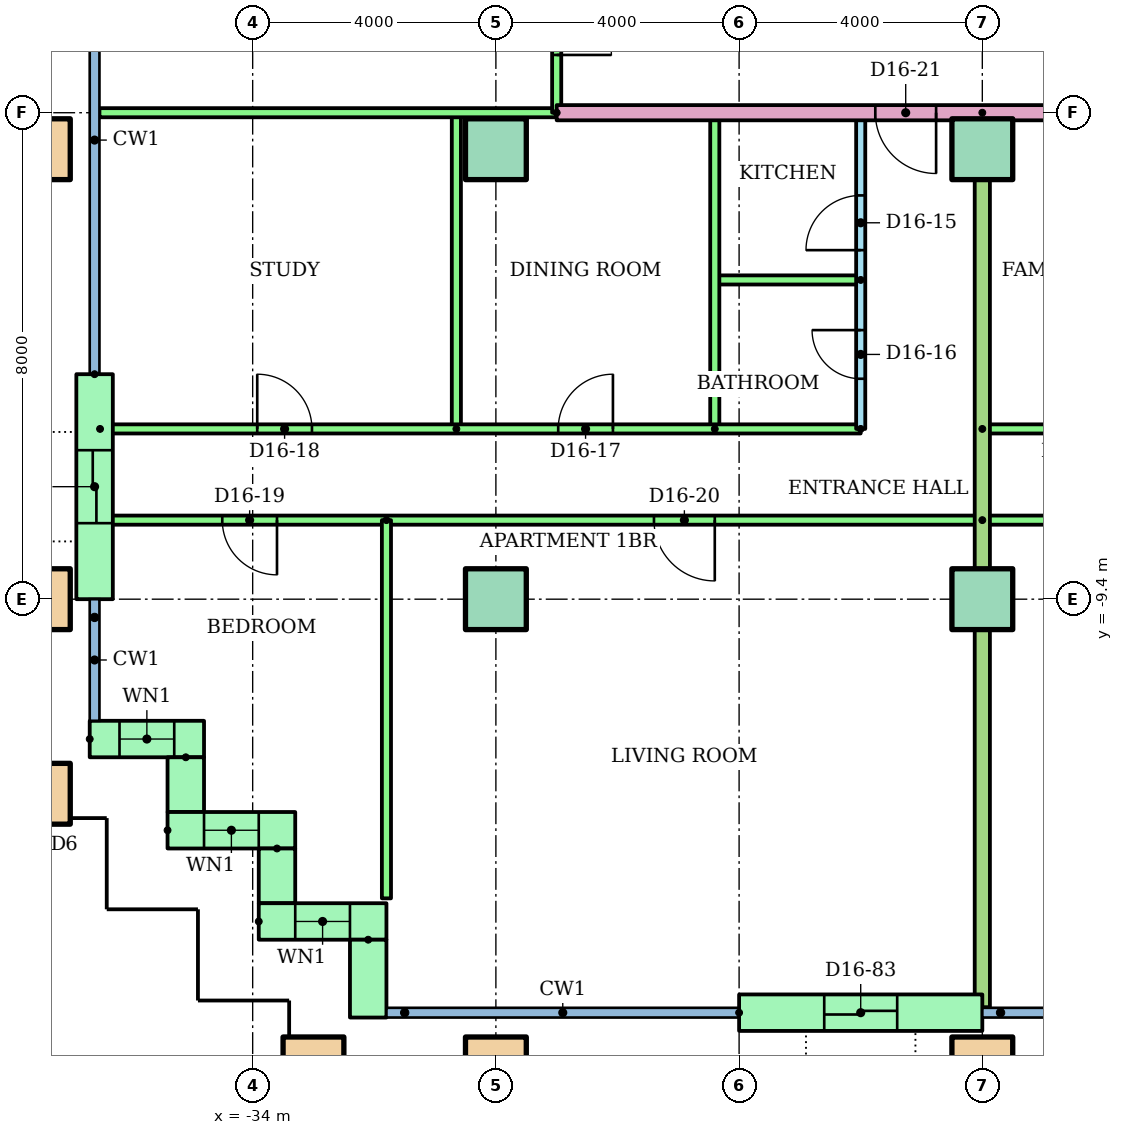
"""IFC4 building model, lengths in metres.
Left out: names, types, materials, properties, quantities, classifications, styles, units other than length and angle.
Written with IfcOpenShell. Run it as: python <this file> out.ifc"""

import sys

from ifc_helpers import new_model, si_unit, direction, frame, frame_2d, origin, origin_2d, place, context, subcontext, project, spatial, rectangle, hollow_rectangle, extrude, element, fill, save


model = new_model("IFC4")
c1 = context("Model", 3, precision=1e-05, world=origin(), true_north=direction((0.0, 1.0)))
c2 = subcontext(c1, "Body", "Model", "MODEL_VIEW")
j1 = project(units=[si_unit("LENGTHUNIT", "METRE"), si_unit("PLANEANGLEUNIT", "RADIAN")], contexts=[c1])
p1 = place(None, origin())
s1 = spatial("IfcSite", under=j1, at=p1, CompositionType="ELEMENT")
p2 = place(p1, origin())
s2 = spatial("IfcBuilding", under=s1, at=p2, CompositionType="ELEMENT")
p3 = place(p2, frame((0.0, 0.0, 60.8)))
s3 = spatial("IfcBuildingStorey", under=s2, at=p3, CompositionType="ELEMENT", Elevation=60.8)
for number, where in (
    (1, (-33.0, -17.1, 0.0)),
    (2, (-30.0, -17.1, 0.0)),
    (3, (-22.0, -17.1, 0.0)),
    (4, (-37.5, -12.6, 0.0)),
    (5, (-37.5, -9.4, 0.0)),
):
    element("IfcColumn", number, at=place(p3, frame(where)), inside=s3, PredefinedType="COLUMN", context=c2, shape_type="SweptSolid", body=[
        extrude(hollow_rectangle(XDim=1.0, YDim=1.0, WallThickness=0.05, at=origin_2d()), origin(), (0.0, 0.0, 1.0), 3.2),
    ])
for number, where in (
    (6, (-30.0, -9.4, 0.0)),
    (7, (-22.0, -9.4, 0.0)),
):
    element("IfcColumn", number, at=place(p3, frame(where)), inside=s3, PredefinedType="COLUMN", context=c2, shape_type="SweptSolid", body=[
        extrude(rectangle(XDim=1.0, YDim=1.0, at=origin_2d()), origin(), (0.0, 0.0, 1.0), 3.2),
    ])
p4 = place(p3, frame((-37.5, -2.0, 0.0)))
e8 = element("IfcColumn", 8, at=p4, inside=s3, PredefinedType="COLUMN", context=c2, shape_type="SweptSolid", body=[
    extrude(hollow_rectangle(XDim=1.0, YDim=1.0, WallThickness=0.05, at=origin_2d()), origin(), (0.0, 0.0, 1.0), 3.2),
])
for number, where in (
    (9, (-30.0, -2.0, 0.0)),
    (10, (-22.0, -2.0, 0.0)),
):
    element("IfcColumn", number, at=place(p3, frame(where)), inside=s3, PredefinedType="COLUMN", context=c2, shape_type="SweptSolid", body=[
        extrude(rectangle(XDim=1.0, YDim=1.0, at=origin_2d()), origin(), (0.0, 0.0, 1.0), 3.2),
    ])
p5 = place(p3, frame((-36.6, -5.7, 0.0), z_axis=(0.0, 0.0, 1.0), x_axis=(0.0, -1.0, 0.0)))
e11 = element("IfcWall", 11, at=p5, inside=s3, PredefinedType="STANDARD", context=c2, shape_type="SweptSolid", body=[
    extrude(rectangle(XDim=3.7, YDim=0.6, at=frame_2d((1.85, 0.0))), origin(), (0.0, 0.0, 1.0), 2.8),
])
p6 = place(p5, frame((1.25, 0.0, 0.0)))
e12 = element("IfcOpeningElement", 12, at=p6, cuts=e11, PredefinedType="OPENING", context=c2, shape_type="SweptSolid", body=[
    extrude(rectangle(XDim=1.2, YDim=2.1, at=frame_2d((0.6, 1.05))), frame((0.0, 0.31, 0.0), z_axis=(0.0, -1.0, 0.0), x_axis=(1.0, 0.0, 0.0)), (0.0, 0.0, 1.0), 0.62),
])
p7 = place(p3, frame((-36.68, -11.7, 0.0)))
e13 = element("IfcWall", 13, at=p7, inside=s3, PredefinedType="STANDARD", context=c2, shape_type="SweptSolid", body=[
    extrude(rectangle(XDim=1.88, YDim=0.6, at=frame_2d((0.94, 0.0))), origin(), (0.0, 0.0, 1.0), 2.8),
])
p8 = place(p7, frame((0.49, 0.0, 0.9)))
e14 = element("IfcOpeningElement", 14, at=p8, cuts=e13, PredefinedType="OPENING", context=c2, shape_type="SweptSolid", body=[
    extrude(rectangle(XDim=0.9, YDim=1.5, at=frame_2d((0.45, 0.75))), frame((0.0, 0.31, 0.0), z_axis=(0.0, -1.0, 0.0), x_axis=(1.0, 0.0, 0.0)), (0.0, 0.0, 1.0), 0.62),
])
p9 = place(p3, frame((-35.1, -12.0, 0.0), z_axis=(0.0, 0.0, 1.0), x_axis=(0.0, -1.0, 0.0)))
e15 = element("IfcWall", 15, at=p9, inside=s3, PredefinedType="STANDARD", context=c2, shape_type="SweptSolid", body=[
    extrude(rectangle(XDim=0.9, YDim=0.6, at=frame_2d((0.45, 0.0))), origin(), (0.0, 0.0, 1.0), 2.8),
])
p10 = place(p3, frame((-35.4, -13.2, 0.0)))
e16 = element("IfcWall", 16, at=p10, inside=s3, PredefinedType="STANDARD", context=c2, shape_type="SweptSolid", body=[
    extrude(rectangle(XDim=2.1, YDim=0.6, at=frame_2d((1.05, 0.0))), origin(), (0.0, 0.0, 1.0), 2.8),
])
p11 = place(p10, frame((0.6, 0.0, 0.9)))
e17 = element("IfcOpeningElement", 17, at=p11, cuts=e16, PredefinedType="OPENING", context=c2, shape_type="SweptSolid", body=[
    extrude(rectangle(XDim=0.9, YDim=1.5, at=frame_2d((0.45, 0.75))), frame((0.0, 0.31, 0.0), z_axis=(0.0, -1.0, 0.0), x_axis=(1.0, 0.0, 0.0)), (0.0, 0.0, 1.0), 0.62),
])
p12 = place(p3, frame((-33.6, -13.5, 0.0), z_axis=(0.0, 0.0, 1.0), x_axis=(0.0, -1.0, 0.0)))
e18 = element("IfcWall", 18, at=p12, inside=s3, PredefinedType="STANDARD", context=c2, shape_type="SweptSolid", body=[
    extrude(rectangle(XDim=0.9, YDim=0.6, at=frame_2d((0.45, 0.0))), origin(), (0.0, 0.0, 1.0), 2.8),
])
p13 = place(p3, frame((-33.9, -14.7, 0.0)))
e19 = element("IfcWall", 19, at=p13, inside=s3, PredefinedType="STANDARD", context=c2, shape_type="SweptSolid", body=[
    extrude(rectangle(XDim=2.1, YDim=0.6, at=frame_2d((1.05, 0.0))), origin(), (0.0, 0.0, 1.0), 2.8),
])
p14 = place(p13, frame((0.6, 0.0, 0.9)))
e20 = element("IfcOpeningElement", 20, at=p14, cuts=e19, PredefinedType="OPENING", context=c2, shape_type="SweptSolid", body=[
    extrude(rectangle(XDim=0.9, YDim=1.5, at=frame_2d((0.45, 0.75))), frame((0.0, 0.31, 0.0), z_axis=(0.0, -1.0, 0.0), x_axis=(1.0, 0.0, 0.0)), (0.0, 0.0, 1.0), 0.62),
])
p15 = place(p3, frame((-32.1, -15.0, 0.0), z_axis=(0.0, 0.0, 1.0), x_axis=(0.0, -1.0, 0.0)))
e21 = element("IfcWall", 21, at=p15, inside=s3, PredefinedType="STANDARD", context=c2, shape_type="SweptSolid", body=[
    extrude(rectangle(XDim=1.28, YDim=0.6, at=frame_2d((0.64, 0.0))), origin(), (0.0, 0.0, 1.0), 2.8),
])
p16 = place(p3, frame((-26.0, -16.2, 0.0)))
e22 = element("IfcWall", 22, at=p16, inside=s3, PredefinedType="STANDARD", context=c2, shape_type="SweptSolid", body=[
    extrude(rectangle(XDim=4.0, YDim=0.6, at=frame_2d((2.0, 0.0))), origin(), (0.0, 0.0, 1.0), 2.8),
])
p17 = place(p16, frame((1.4, 0.0, 0.0)))
e23 = element("IfcOpeningElement", 23, at=p17, cuts=e22, PredefinedType="OPENING", context=c2, shape_type="SweptSolid", body=[
    extrude(rectangle(XDim=1.2, YDim=2.1, at=frame_2d((0.6, 1.05))), frame((0.0, 0.31, 0.0), z_axis=(0.0, -1.0, 0.0), x_axis=(1.0, 0.0, 0.0)), (0.0, 0.0, 1.0), 0.62),
])
p18 = place(p3, frame((-24.0, -6.6, 0.0), z_axis=(0.0, 0.0, 1.0), x_axis=(0.0, 1.0, 0.0)))
e24 = element("IfcWall", 24, at=p18, inside=s3, PredefinedType="PARTITIONING", context=c2, shape_type="SweptSolid", body=[
    extrude(rectangle(XDim=5.2, YDim=0.15, at=frame_2d((2.6, 0.0))), origin(), (0.0, 0.0, 1.0), 2.4),
])
p19 = place(p18, frame((2.94, 0.0, 0.0)))
e25 = element("IfcOpeningElement", 25, at=p19, cuts=e24, PredefinedType="OPENING", context=c2, shape_type="SweptSolid", body=[
    extrude(rectangle(XDim=0.9, YDim=2.1, at=frame_2d((0.45, 1.05))), frame((0.0, 0.085, 0.0), z_axis=(0.0, -1.0, 0.0), x_axis=(1.0, 0.0, 0.0)), (0.0, 0.0, 1.0), 0.17),
])
p20 = place(p18, frame((0.825, 0.0, 0.0)))
e26 = element("IfcOpeningElement", 26, at=p20, cuts=e24, PredefinedType="OPENING", context=c2, shape_type="SweptSolid", body=[
    extrude(rectangle(XDim=0.8, YDim=2.1, at=frame_2d((0.4, 1.05))), frame((0.0, 0.085, 0.0), z_axis=(0.0, -1.0, 0.0), x_axis=(1.0, 0.0, 0.0)), (0.0, 0.0, 1.0), 0.17),
])
p21 = place(p3, frame((-24.0, -4.15, 0.0), z_axis=(0.0, 0.0, 1.0), x_axis=(-1.0, 0.0, 0.0)))
e27 = element("IfcWall", 27, at=p21, inside=s3, PredefinedType="PARTITIONING", context=c2, shape_type="SweptSolid", body=[
    extrude(rectangle(XDim=2.4, YDim=0.15, at=frame_2d((1.2, 0.0))), origin(), (0.0, 0.0, 1.0), 2.4),
])
for number, where, z_axis, x_axis in (
    (28, (-26.4, -6.6, 0.0), (0.0, 0.0, 1.0), (0.0, 1.0, 0.0)),
    (29, (-30.65, -6.6, 0.0), (0.0, 0.0, 1.0), (0.0, 1.0, 0.0)),
):
    element("IfcWall", number, at=place(p3, frame(where, z_axis=z_axis, x_axis=x_axis)), inside=s3, PredefinedType="PARTITIONING", context=c2, shape_type="SweptSolid", body=[
        extrude(rectangle(XDim=5.2, YDim=0.15, at=frame_2d((2.6, 0.0))), origin(), (0.0, 0.0, 1.0), 2.4),
    ])
p22 = place(p3, frame((-36.51, -6.6, 0.0)))
e30 = element("IfcWall", 30, at=p22, inside=s3, PredefinedType="PARTITIONING", context=c2, shape_type="SweptSolid", body=[
    extrude(rectangle(XDim=12.51, YDim=0.15, at=frame_2d((6.255, 0.0))), origin(), (0.0, 0.0, 1.0), 2.4),
])
p23 = place(p22, frame((7.535, 0.0, 0.0)))
e31 = element("IfcOpeningElement", 31, at=p23, cuts=e30, PredefinedType="OPENING", context=c2, shape_type="SweptSolid", body=[
    extrude(rectangle(XDim=0.9, YDim=2.1, at=frame_2d((0.45, 1.05))), frame((0.0, 0.085, 0.0), z_axis=(0.0, -1.0, 0.0), x_axis=(1.0, 0.0, 0.0)), (0.0, 0.0, 1.0), 0.17),
])
p24 = place(p22, frame((2.585, 0.0, 0.0)))
e32 = element("IfcOpeningElement", 32, at=p24, cuts=e30, PredefinedType="OPENING", context=c2, shape_type="SweptSolid", body=[
    extrude(rectangle(XDim=0.9, YDim=2.1, at=frame_2d((0.45, 1.05))), frame((0.0, 0.085, 0.0), z_axis=(0.0, -1.0, 0.0), x_axis=(1.0, 0.0, 0.0)), (0.0, 0.0, 1.0), 0.17),
])
p25 = place(p3, frame((-22.0, -8.1, 0.0), z_axis=(0.0, 0.0, 1.0), x_axis=(-1.0, 0.0, 0.0)))
e33 = element("IfcWall", 33, at=p25, inside=s3, PredefinedType="PARTITIONING", context=c2, shape_type="SweptSolid", body=[
    extrude(rectangle(XDim=14.51, YDim=0.15, at=frame_2d((7.255, 0.0))), origin(), (0.0, 0.0, 1.0), 2.4),
])
p26 = place(p25, frame((11.6, 0.0, 0.0)))
e34 = element("IfcOpeningElement", 34, at=p26, cuts=e33, PredefinedType="OPENING", context=c2, shape_type="SweptSolid", body=[
    extrude(rectangle(XDim=0.9, YDim=2.1, at=frame_2d((0.45, 1.05))), frame((0.0, 0.085, 0.0), z_axis=(0.0, -1.0, 0.0), x_axis=(1.0, 0.0, 0.0)), (0.0, 0.0, 1.0), 0.17),
])
p27 = place(p25, frame((4.4, 0.0, 0.0)))
e35 = element("IfcOpeningElement", 35, at=p27, cuts=e33, PredefinedType="OPENING", context=c2, shape_type="SweptSolid", body=[
    extrude(rectangle(XDim=1.0, YDim=2.1, at=frame_2d((0.5, 1.05))), frame((0.0, 0.085, 0.0), z_axis=(0.0, -1.0, 0.0), x_axis=(1.0, 0.0, 0.0)), (0.0, 0.0, 1.0), 0.17),
])
p28 = place(p3, frame((-31.8, -8.1, 0.0), z_axis=(0.0, 0.0, 1.0), x_axis=(0.0, -1.0, 0.0)))
e36 = element("IfcWall", 36, at=p28, inside=s3, PredefinedType="PARTITIONING", context=c2, shape_type="SweptSolid", body=[
    extrude(rectangle(XDim=6.22, YDim=0.15, at=frame_2d((3.11, 0.0))), origin(), (0.0, 0.0, 1.0), 2.4),
])
p29 = place(p3, frame((-22.0, -6.6, 0.0)))
e37 = element("IfcWall", 37, at=p29, inside=s3, PredefinedType="PARTITIONING", context=c2, shape_type="SweptSolid", body=[
    extrude(rectangle(XDim=14.0, YDim=0.15, at=frame_2d((7.0, 0.0))), origin(), (0.0, 0.0, 1.0), 2.4),
])
p30 = place(p29, frame((8.775, 0.0, 0.0)))
e38 = element("IfcOpeningElement", 38, at=p30, cuts=e37, PredefinedType="OPENING", context=c2, shape_type="SweptSolid", body=[
    extrude(rectangle(XDim=0.9, YDim=2.1, at=frame_2d((0.45, 1.05))), frame((0.0, 0.085, 0.0), z_axis=(0.0, -1.0, 0.0), x_axis=(1.0, 0.0, 0.0)), (0.0, 0.0, 1.0), 0.17),
])
p31 = place(p29, frame((4.525, 0.0, 0.0)))
e39 = element("IfcOpeningElement", 39, at=p31, cuts=e37, PredefinedType="OPENING", context=c2, shape_type="SweptSolid", body=[
    extrude(rectangle(XDim=0.9, YDim=2.1, at=frame_2d((0.45, 1.05))), frame((0.0, 0.085, 0.0), z_axis=(0.0, -1.0, 0.0), x_axis=(1.0, 0.0, 0.0)), (0.0, 0.0, 1.0), 0.17),
])
p32 = place(p29, frame((1.1, 0.0, 0.0)))
e40 = element("IfcOpeningElement", 40, at=p32, cuts=e37, PredefinedType="OPENING", context=c2, shape_type="SweptSolid", body=[
    extrude(rectangle(XDim=0.9, YDim=2.1, at=frame_2d((0.45, 1.05))), frame((0.0, 0.085, 0.0), z_axis=(0.0, -1.0, 0.0), x_axis=(1.0, 0.0, 0.0)), (0.0, 0.0, 1.0), 0.17),
])
p33 = place(p3, frame((-6.0, -8.1, 0.0), z_axis=(0.0, 0.0, 1.0), x_axis=(-1.0, 0.0, 0.0)))
e41 = element("IfcWall", 41, at=p33, inside=s3, PredefinedType="PARTITIONING", context=c2, shape_type="SweptSolid", body=[
    extrude(rectangle(XDim=16.0, YDim=0.15, at=frame_2d((8.0, 0.0))), origin(), (0.0, 0.0, 1.0), 2.4),
])
p34 = place(p33, frame((13.55, 0.0, 0.0)))
e42 = element("IfcOpeningElement", 42, at=p34, cuts=e41, PredefinedType="OPENING", context=c2, shape_type="SweptSolid", body=[
    extrude(rectangle(XDim=0.9, YDim=2.1, at=frame_2d((0.45, 1.05))), frame((0.0, 0.085, 0.0), z_axis=(0.0, -1.0, 0.0), x_axis=(1.0, 0.0, 0.0)), (0.0, 0.0, 1.0), 0.17),
])
p35 = place(p33, frame((9.5, 0.0, 0.0)))
e43 = element("IfcOpeningElement", 43, at=p35, cuts=e41, PredefinedType="OPENING", context=c2, shape_type="SweptSolid", body=[
    extrude(rectangle(XDim=1.0, YDim=2.1, at=frame_2d((0.5, 1.05))), frame((0.0, 0.085, 0.0), z_axis=(0.0, -1.0, 0.0), x_axis=(1.0, 0.0, 0.0)), (0.0, 0.0, 1.0), 0.17),
])
p36 = place(p33, frame((5.55, 0.0, 0.0)))
e44 = element("IfcOpeningElement", 44, at=p36, cuts=e41, PredefinedType="OPENING", context=c2, shape_type="SweptSolid", body=[
    extrude(rectangle(XDim=0.9, YDim=2.1, at=frame_2d((0.45, 1.05))), frame((0.0, 0.085, 0.0), z_axis=(0.0, -1.0, 0.0), x_axis=(1.0, 0.0, 0.0)), (0.0, 0.0, 1.0), 0.17),
])
p37 = place(p33, frame((1.55, 0.0, 0.0)))
e45 = element("IfcOpeningElement", 45, at=p37, cuts=e41, PredefinedType="OPENING", context=c2, shape_type="SweptSolid", body=[
    extrude(rectangle(XDim=0.9, YDim=2.1, at=frame_2d((0.45, 1.05))), frame((0.0, 0.085, 0.0), z_axis=(0.0, -1.0, 0.0), x_axis=(1.0, 0.0, 0.0)), (0.0, 0.0, 1.0), 0.17),
])
p38 = place(p3, frame((-22.0, -1.4, 0.0), z_axis=(0.0, 0.0, 1.0), x_axis=(0.0, -1.0, 0.0)))
e46 = element("IfcWall", 46, at=p38, inside=s3, PredefinedType="PARTITIONING", context=c2, shape_type="SweptSolid", body=[
    extrude(rectangle(XDim=14.71, YDim=0.25, at=frame_2d((7.355, 0.0))), origin(), (0.0, 0.0, 1.0), 2.4),
])
p39 = place(p3, frame((-14.0, -1.4, 0.0), z_axis=(0.0, 0.0, 1.0), x_axis=(-1.0, 0.0, 0.0)))
e47 = element("IfcWall", 47, at=p39, inside=s3, PredefinedType="PARTITIONING", context=c2, shape_type="SweptSolid", body=[
    extrude(rectangle(XDim=15.0, YDim=0.25, at=frame_2d((7.5, 0.0))), origin(), (0.0, 0.0, 1.0), 2.4),
])
p40 = place(p39, frame((8.76, 0.0, 0.0)))
e48 = element("IfcOpeningElement", 48, at=p40, cuts=e47, PredefinedType="OPENING", context=c2, shape_type="SweptSolid", body=[
    extrude(rectangle(XDim=1.0, YDim=2.1, at=frame_2d((0.5, 1.05))), frame((0.0, 0.135, 0.0), z_axis=(0.0, -1.0, 0.0), x_axis=(1.0, 0.0, 0.0)), (0.0, 0.0, 1.0), 0.27),
])
p41 = place(p3, frame((-29.0, -1.4, 0.0), z_axis=(0.0, 0.0, 1.0), x_axis=(-1.0, 0.0, 0.0)))
e49 = element("IfcWall", 49, at=p41, inside=s3, PredefinedType="PARTITIONING", context=c2, shape_type="SweptSolid", body=[
    extrude(rectangle(XDim=7.52, YDim=0.15, at=frame_2d((3.76, 0.0))), origin(), (0.0, 0.0, 1.0), 2.4),
])
p42 = place(p3, frame((-29.0, 1.4, 0.0), z_axis=(0.0, 0.0, 1.0), x_axis=(0.0, -1.0, 0.0)))
e50 = element("IfcWall", 50, at=p42, inside=s3, PredefinedType="PARTITIONING", context=c2, shape_type="SweptSolid", body=[
    extrude(rectangle(XDim=2.8, YDim=0.15, at=frame_2d((1.4, 0.0))), origin(), (0.0, 0.0, 1.0), 2.4),
])
p43 = place(p42, frame((0.95, 0.0, 0.0)))
e51 = element("IfcOpeningElement", 51, at=p43, cuts=e50, PredefinedType="OPENING", context=c2, shape_type="SweptSolid", body=[
    extrude(rectangle(XDim=0.9, YDim=2.1, at=frame_2d((0.45, 1.05))), frame((0.0, 0.085, 0.0), z_axis=(0.0, -1.0, 0.0), x_axis=(1.0, 0.0, 0.0)), (0.0, 0.0, 1.0), 0.17),
])
p44 = place(p8, origin())
e52 = element("IfcWindow", 52, at=p44, inside=s3, PartitioningType="SINGLE_PANEL", PredefinedType="WINDOW", context=c2, shape_type="SweptSolid", body=[
    extrude(rectangle(XDim=0.9, YDim=1.5, at=frame_2d((0.45, 0.75))), frame((0.0, 0.03, 0.0), z_axis=(0.0, -1.0, 0.0), x_axis=(1.0, 0.0, 0.0)), (0.0, 0.0, 1.0), 0.06),
])
fill(e14, e52)
p45 = place(p11, origin())
e53 = element("IfcWindow", 53, at=p45, inside=s3, PartitioningType="SINGLE_PANEL", PredefinedType="WINDOW", context=c2, shape_type="SweptSolid", body=[
    extrude(rectangle(XDim=0.9, YDim=1.5, at=frame_2d((0.45, 0.75))), frame((0.0, 0.03, 0.0), z_axis=(0.0, -1.0, 0.0), x_axis=(1.0, 0.0, 0.0)), (0.0, 0.0, 1.0), 0.06),
])
fill(e17, e53)
p46 = place(p14, origin())
e54 = element("IfcWindow", 54, at=p46, inside=s3, PartitioningType="SINGLE_PANEL", PredefinedType="WINDOW", context=c2, shape_type="SweptSolid", body=[
    extrude(rectangle(XDim=0.9, YDim=1.5, at=frame_2d((0.45, 0.75))), frame((0.0, 0.03, 0.0), z_axis=(0.0, -1.0, 0.0), x_axis=(1.0, 0.0, 0.0)), (0.0, 0.0, 1.0), 0.06),
])
fill(e20, e54)
p47 = place(p19, origin())
e55 = element("IfcDoor", 55, at=p47, inside=s3, OperationType="SINGLE_SWING_LEFT", PredefinedType="DOOR", context=c2, shape_type="SweptSolid", body=[
    extrude(rectangle(XDim=0.9, YDim=2.1, at=frame_2d((0.45, 1.05))), frame((0.0, 0.025, 0.0), z_axis=(0.0, -1.0, 0.0), x_axis=(1.0, 0.0, 0.0)), (0.0, 0.0, 1.0), 0.05),
])
fill(e25, e55)
p48 = place(p20, origin())
e56 = element("IfcDoor", 56, at=p48, inside=s3, OperationType="SINGLE_SWING_RIGHT", PredefinedType="DOOR", context=c2, shape_type="SweptSolid", body=[
    extrude(rectangle(XDim=0.8, YDim=2.1, at=frame_2d((0.4, 1.05))), frame((0.0, 0.025, 0.0), z_axis=(0.0, -1.0, 0.0), x_axis=(1.0, 0.0, 0.0)), (0.0, 0.0, 1.0), 0.05),
])
fill(e26, e56)
p49 = place(p23, origin())
e57 = element("IfcDoor", 57, at=p49, inside=s3, OperationType="SINGLE_SWING_RIGHT", PredefinedType="DOOR", context=c2, shape_type="SweptSolid", body=[
    extrude(rectangle(XDim=0.9, YDim=2.1, at=frame_2d((0.45, 1.05))), frame((0.0, 0.025, 0.0), z_axis=(0.0, -1.0, 0.0), x_axis=(1.0, 0.0, 0.0)), (0.0, 0.0, 1.0), 0.05),
])
fill(e31, e57)
p50 = place(p24, origin())
e58 = element("IfcDoor", 58, at=p50, inside=s3, OperationType="SINGLE_SWING_LEFT", PredefinedType="DOOR", context=c2, shape_type="SweptSolid", body=[
    extrude(rectangle(XDim=0.9, YDim=2.1, at=frame_2d((0.45, 1.05))), frame((0.0, 0.025, 0.0), z_axis=(0.0, -1.0, 0.0), x_axis=(1.0, 0.0, 0.0)), (0.0, 0.0, 1.0), 0.05),
])
fill(e32, e58)
p51 = place(p26, origin())
e59 = element("IfcDoor", 59, at=p51, inside=s3, OperationType="SINGLE_SWING_LEFT", PredefinedType="DOOR", context=c2, shape_type="SweptSolid", body=[
    extrude(rectangle(XDim=0.9, YDim=2.1, at=frame_2d((0.45, 1.05))), frame((0.0, 0.025, 0.0), z_axis=(0.0, -1.0, 0.0), x_axis=(1.0, 0.0, 0.0)), (0.0, 0.0, 1.0), 0.05),
])
fill(e34, e59)
p52 = place(p27, origin())
e60 = element("IfcDoor", 60, at=p52, inside=s3, OperationType="SINGLE_SWING_LEFT", PredefinedType="DOOR", context=c2, shape_type="SweptSolid", body=[
    extrude(rectangle(XDim=1.0, YDim=2.1, at=frame_2d((0.5, 1.05))), frame((0.0, 0.025, 0.0), z_axis=(0.0, -1.0, 0.0), x_axis=(1.0, 0.0, 0.0)), (0.0, 0.0, 1.0), 0.05),
])
fill(e35, e60)
p53 = place(p40, origin())
e61 = element("IfcDoor", 61, at=p53, inside=s3, OperationType="SINGLE_SWING_LEFT", PredefinedType="DOOR", context=c2, shape_type="SweptSolid", body=[
    extrude(rectangle(XDim=1.0, YDim=2.1, at=frame_2d((0.5, 1.05))), frame((0.0, 0.025, 0.0), z_axis=(0.0, -1.0, 0.0), x_axis=(1.0, 0.0, 0.0)), (0.0, 0.0, 1.0), 0.05),
])
fill(e48, e61)
p54 = place(p43, origin())
e62 = element("IfcDoor", 62, at=p54, inside=s3, OperationType="SINGLE_SWING_RIGHT", PredefinedType="DOOR", context=c2, shape_type="SweptSolid", body=[
    extrude(rectangle(XDim=0.9, YDim=2.1, at=frame_2d((0.45, 1.05))), frame((0.0, 0.025, 0.0), z_axis=(0.0, -1.0, 0.0), x_axis=(1.0, 0.0, 0.0)), (0.0, 0.0, 1.0), 0.05),
])
fill(e51, e62)
p55 = place(p6, origin())
e63 = element("IfcDoor", 63, at=p55, inside=s3, OperationType="SLIDING_TO_LEFT", PredefinedType="DOOR", context=c2, shape_type="SweptSolid", body=[
    extrude(rectangle(XDim=1.2, YDim=2.1, at=frame_2d((0.6, 1.05))), frame((0.0, 0.025, 0.0), z_axis=(0.0, -1.0, 0.0), x_axis=(1.0, 0.0, 0.0)), (0.0, 0.0, 1.0), 0.05),
])
fill(e12, e63)
p56 = place(p17, origin())
e64 = element("IfcDoor", 64, at=p56, inside=s3, OperationType="SLIDING_TO_LEFT", PredefinedType="DOOR", context=c2, shape_type="SweptSolid", body=[
    extrude(rectangle(XDim=1.2, YDim=2.1, at=frame_2d((0.6, 1.05))), frame((0.0, 0.025, 0.0), z_axis=(0.0, -1.0, 0.0), x_axis=(1.0, 0.0, 0.0)), (0.0, 0.0, 1.0), 0.05),
])
fill(e23, e64)
save(model, sys.argv[1])
